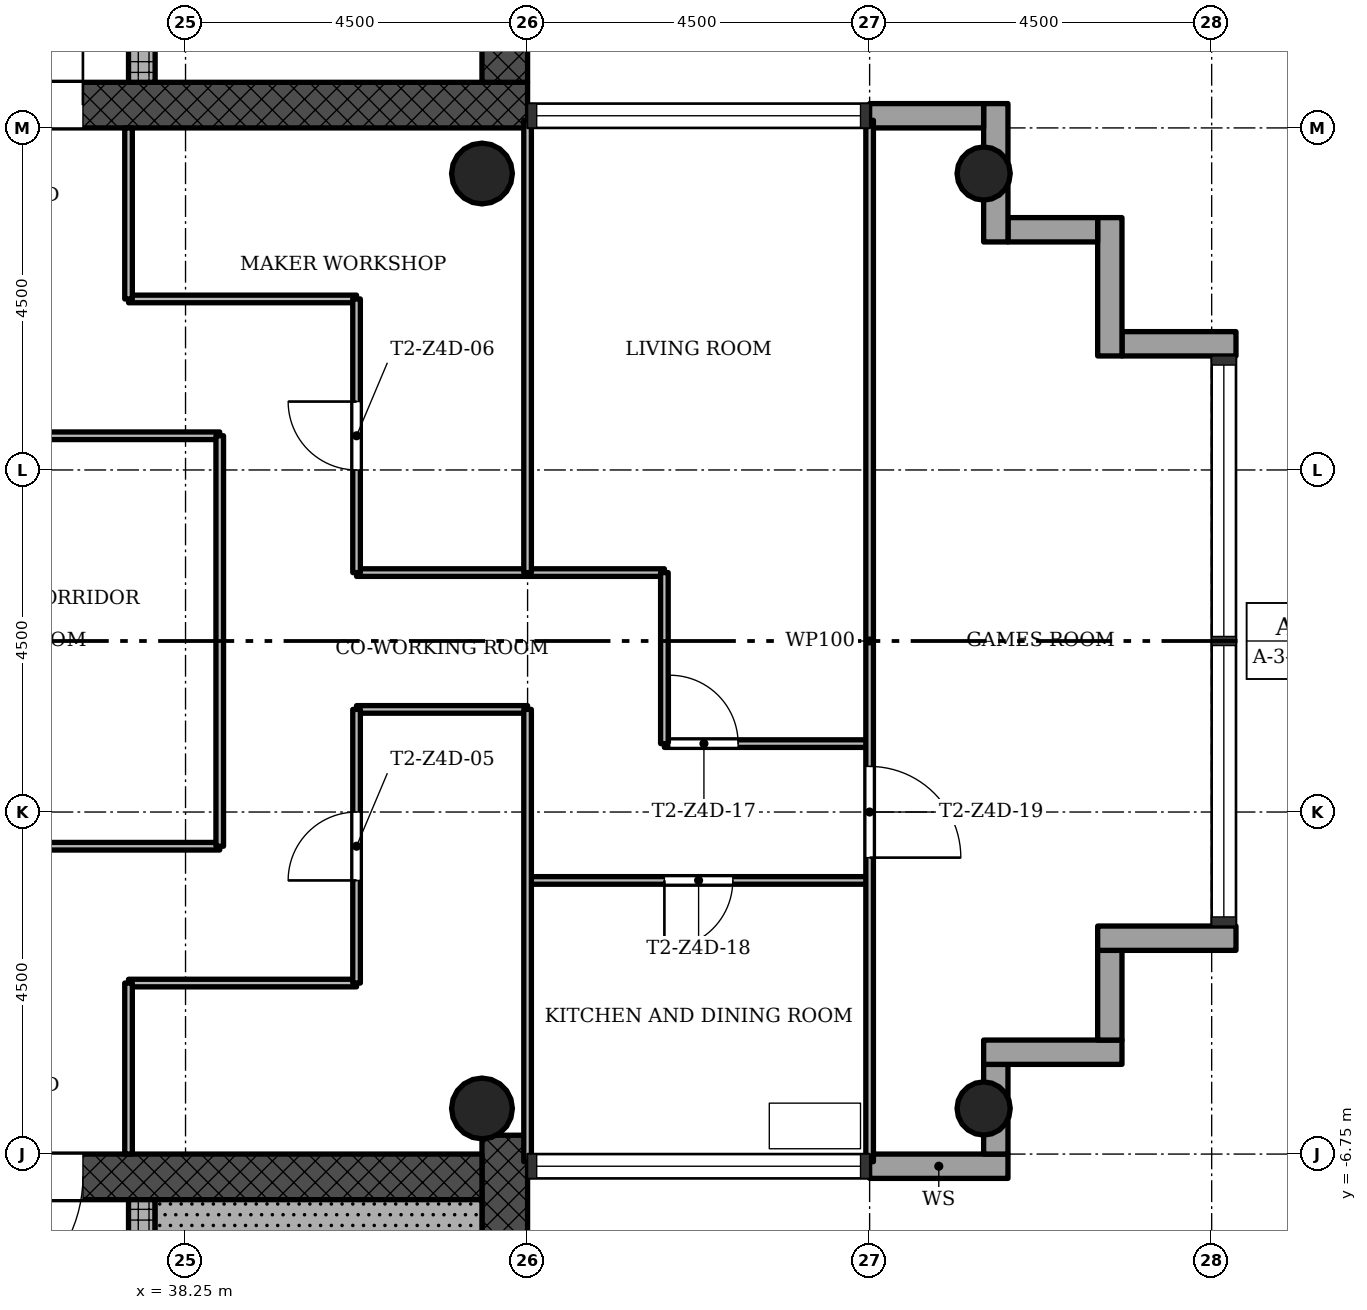
"""IFC4 building model, lengths in metres.
Left out: names, types, materials, properties, quantities, classifications, styles, units other than length and angle.
Written with IfcOpenShell. Run it as: python <this file> out.ifc"""

import sys

from ifc_helpers import new_model, si_unit, direction, frame, frame_2d, origin, origin_2d, place, context, subcontext, project, spatial, rectangle, hollow_circle, extrude, element, fill, save


model = new_model("IFC4")
c1 = context("Model", 3, precision=1e-05, world=origin(), true_north=direction((0.0, 1.0)))
c2 = subcontext(c1, "Body", "Model", "MODEL_VIEW")
j1 = project(units=[si_unit("LENGTHUNIT", "METRE"), si_unit("PLANEANGLEUNIT", "RADIAN")], contexts=[c1])
p1 = place(None, origin())
s1 = spatial("IfcSite", under=j1, at=p1, CompositionType="ELEMENT")
p2 = place(p1, origin())
s2 = spatial("IfcBuilding", under=s1, at=p2, CompositionType="ELEMENT")
p3 = place(p2, frame((0.0, 0.0, 199.4)))
s3 = spatial("IfcBuildingStorey", under=s2, at=p3, CompositionType="ELEMENT", Elevation=199.4)
p4 = place(p3, frame((29.85, 7.05, 0.0), z_axis=(0.0, 0.0, 1.0), x_axis=(1.0, 0.0, 0.0)))
e1 = element("IfcWall", 1, at=p4, inside=s3, PredefinedType="SHEAR", context=c2, shape_type="SweptSolid", body=[
    extrude(rectangle(XDim=12.9, YDim=0.6, at=frame_2d((6.45, 0.0))), origin(), (0.0, 0.0, 1.0), 3.4),
])
p5 = place(p4, frame((5.25, 0.0, 0.0)))
e2 = element("IfcOpeningElement", 2, at=p5, cuts=e1, PredefinedType="OPENING", context=c2, shape_type="SweptSolid", body=[
    extrude(rectangle(XDim=1.8, YDim=2.1, at=frame_2d((0.9, 1.05))), frame((0.0, 0.31, 0.0), z_axis=(0.0, -1.0, 0.0), x_axis=(1.0, 0.0, 0.0)), (0.0, 0.0, 1.0), 0.62),
])
p6 = place(p3, frame((42.45, 7.35, 0.0), z_axis=(0.0, 0.0, 1.0), x_axis=(0.0, 1.0, 0.0)))
e3 = element("IfcWall", 3, at=p6, inside=s3, PredefinedType="SHEAR", context=c2, shape_type="SweptSolid", body=[
    extrude(rectangle(XDim=8.4, YDim=0.6, at=frame_2d((4.2, 0.0))), origin(), (0.0, 0.0, 1.0), 3.4),
])
p7 = place(p3, frame((37.675, 7.35, 0.0), z_axis=(0.0, 0.0, 1.0), x_axis=(0.0, 1.0, 0.0)))
e4 = element("IfcWall", 4, at=p7, inside=s3, PredefinedType="SHEAR", context=c2, shape_type="SweptSolid", body=[
    extrude(rectangle(XDim=7.8, YDim=0.35, at=frame_2d((3.9, 0.0))), origin(), (0.0, 0.0, 1.0), 3.4),
])
p8 = place(p7, frame((1.15, 0.0, 0.0)))
e5 = element("IfcOpeningElement", 5, at=p8, cuts=e4, PredefinedType="OPENING", context=c2, shape_type="SweptSolid", body=[
    extrude(rectangle(XDim=1.1, YDim=2.1, at=frame_2d((0.55, 1.05))), frame((0.0, 0.185, 0.0), z_axis=(0.0, -1.0, 0.0), x_axis=(1.0, 0.0, 0.0)), (0.0, 0.0, 1.0), 0.37),
])
p9 = place(p7, frame((3.35, 0.0, 0.0)))
e6 = element("IfcOpeningElement", 6, at=p9, cuts=e4, PredefinedType="OPENING", context=c2, shape_type="SweptSolid", body=[
    extrude(rectangle(XDim=1.1, YDim=2.1, at=frame_2d((0.55, 1.05))), frame((0.0, 0.185, 0.0), z_axis=(0.0, -1.0, 0.0), x_axis=(1.0, 0.0, 0.0)), (0.0, 0.0, 1.0), 0.37),
])
p10 = place(p7, frame((5.55, 0.0, 0.0)))
e7 = element("IfcOpeningElement", 7, at=p10, cuts=e4, PredefinedType="OPENING", context=c2, shape_type="SweptSolid", body=[
    extrude(rectangle(XDim=1.1, YDim=2.1, at=frame_2d((0.55, 1.05))), frame((0.0, 0.185, 0.0), z_axis=(0.0, -1.0, 0.0), x_axis=(1.0, 0.0, 0.0)), (0.0, 0.0, 1.0), 0.37),
])
p11 = place(p3, frame((42.45, -15.15, 0.0), z_axis=(0.0, 0.0, 1.0), x_axis=(0.0, 1.0, 0.0)))
e8 = element("IfcWall", 8, at=p11, inside=s3, PredefinedType="SHEAR", context=c2, shape_type="SweptSolid", body=[
    extrude(rectangle(XDim=8.648, YDim=0.6, at=frame_2d((4.324, 0.0))), origin(), (0.0, 0.0, 1.0), 3.4),
])
p12 = place(p3, frame((42.15, -7.05, 0.0), z_axis=(0.0, 0.0, 1.0), x_axis=(-1.0, 0.0, 0.0)))
e9 = element("IfcWall", 9, at=p12, inside=s3, PredefinedType="SHEAR", context=c2, shape_type="SweptSolid", body=[
    extrude(rectangle(XDim=12.9, YDim=0.6, at=frame_2d((6.45, 0.0))), origin(), (0.0, 0.0, 1.0), 3.4),
])
p13 = place(p12, frame((5.25, 0.0, 0.0)))
e10 = element("IfcOpeningElement", 10, at=p13, cuts=e9, PredefinedType="OPENING", context=c2, shape_type="SweptSolid", body=[
    extrude(rectangle(XDim=1.8, YDim=2.1, at=frame_2d((0.9, 1.05))), frame((0.0, 0.31, 0.0), z_axis=(0.0, -1.0, 0.0), x_axis=(1.0, 0.0, 0.0)), (0.0, 0.0, 1.0), 0.62),
])
p14 = place(p3, frame((37.675, -15.15, 0.0), z_axis=(0.0, 0.0, 1.0), x_axis=(0.0, 1.0, 0.0)))
e11 = element("IfcWall", 11, at=p14, inside=s3, PredefinedType="SHEAR", context=c2, shape_type="SweptSolid", body=[
    extrude(rectangle(XDim=7.8, YDim=0.35, at=frame_2d((3.9, 0.0))), origin(), (0.0, 0.0, 1.0), 3.4),
])
p15 = place(p14, frame((5.85, 0.0, 0.0)))
e12 = element("IfcOpeningElement", 12, at=p15, cuts=e11, PredefinedType="OPENING", context=c2, shape_type="SweptSolid", body=[
    extrude(rectangle(XDim=0.9, YDim=2.1, at=frame_2d((0.45, 1.05))), frame((0.0, 0.185, 0.0), z_axis=(0.0, -1.0, 0.0), x_axis=(1.0, 0.0, 0.0)), (0.0, 0.0, 1.0), 0.37),
])
for number, where, z_axis, x_axis in (
    (13, (48.75, -6.15, 0.0), (0.0, 0.0, 1.0), (1.0, 0.0, 0.0)),
    (14, (48.75, 6.15, 0.0), (0.0, 0.0, 1.0), (1.0, 0.0, 0.0)),
):
    element("IfcColumn", number, at=place(p3, frame(where, z_axis=z_axis, x_axis=x_axis)), inside=s3, PredefinedType="COLUMN", context=c2, shape_type="SweptSolid", body=[
        extrude(hollow_circle(Radius=0.35, WallThickness=0.025, at=origin_2d()), origin(), (0.0, 0.0, 1.0), 3.4),
    ])
for number, where, z_axis, x_axis in (
    (15, (42.15, -6.15, 0.0), (0.0, 0.0, 1.0), (1.0, 0.0, 0.0)),
    (16, (42.15, 6.15, 0.0), (0.0, 0.0, 1.0), (1.0, 0.0, 0.0)),
):
    element("IfcColumn", number, at=place(p3, frame(where, z_axis=z_axis, x_axis=x_axis)), inside=s3, PredefinedType="COLUMN", context=c2, shape_type="SweptSolid", body=[
        extrude(hollow_circle(Radius=0.4, WallThickness=0.028, at=origin_2d()), origin(), (0.0, 0.0, 1.0), 3.4),
    ])
p16 = place(p3, frame((47.25, -6.91, -0.3), z_axis=(0.0, 0.0, 1.0), x_axis=(1.0, 0.0, 0.0)))
e17 = element("IfcWall", 17, at=p16, inside=s3, PredefinedType="STANDARD", context=c2, shape_type="SweptSolid", body=[
    extrude(rectangle(XDim=1.82, YDim=0.32, at=frame_2d((0.91, 0.0))), origin(), (0.0, 0.0, 1.0), 3.4),
])
p17 = place(p3, frame((48.91, -6.75, -0.3), z_axis=(0.0, 0.0, 1.0), x_axis=(0.0, 1.0, 0.0)))
e18 = element("IfcWall", 18, at=p17, inside=s3, PredefinedType="STANDARD", context=c2, shape_type="SweptSolid", body=[
    extrude(rectangle(XDim=1.18, YDim=0.32, at=frame_2d((0.59, 0.0))), origin(), (0.0, 0.0, 1.0), 3.4),
])
p18 = place(p3, frame((48.75, -5.41, -0.3), z_axis=(0.0, 0.0, 1.0), x_axis=(1.0, 0.0, 0.0)))
e19 = element("IfcWall", 19, at=p18, inside=s3, PredefinedType="STANDARD", context=c2, shape_type="SweptSolid", body=[
    extrude(rectangle(XDim=1.82, YDim=0.32, at=frame_2d((0.91, 0.0))), origin(), (0.0, 0.0, 1.0), 3.4),
])
p19 = place(p3, frame((50.41, -5.25, -0.3), z_axis=(0.0, 0.0, 1.0), x_axis=(0.0, 1.0, 0.0)))
e20 = element("IfcWall", 20, at=p19, inside=s3, PredefinedType="STANDARD", context=c2, shape_type="SweptSolid", body=[
    extrude(rectangle(XDim=1.18, YDim=0.32, at=frame_2d((0.59, 0.0))), origin(), (0.0, 0.0, 1.0), 3.4),
])
p20 = place(p3, frame((50.25, -3.91, -0.3), z_axis=(0.0, 0.0, 1.0), x_axis=(1.0, 0.0, 0.0)))
e21 = element("IfcWall", 21, at=p20, inside=s3, PredefinedType="STANDARD", context=c2, shape_type="SweptSolid", body=[
    extrude(rectangle(XDim=1.82, YDim=0.32, at=frame_2d((0.91, 0.0))), origin(), (0.0, 0.0, 1.0), 3.4),
])
p21 = place(p3, frame((52.07, 3.91, -0.3), z_axis=(0.0, 0.0, 1.0), x_axis=(-1.0, 0.0, 0.0)))
e22 = element("IfcWall", 22, at=p21, inside=s3, PredefinedType="STANDARD", context=c2, shape_type="SweptSolid", body=[
    extrude(rectangle(XDim=1.5, YDim=0.32, at=frame_2d((0.75, 0.0))), origin(), (0.0, 0.0, 1.0), 3.4),
])
p22 = place(p3, frame((50.41, 3.75, -0.3), z_axis=(0.0, 0.0, 1.0), x_axis=(0.0, 1.0, 0.0)))
e23 = element("IfcWall", 23, at=p22, inside=s3, PredefinedType="STANDARD", context=c2, shape_type="SweptSolid", body=[
    extrude(rectangle(XDim=1.82, YDim=0.32, at=frame_2d((0.91, 0.0))), origin(), (0.0, 0.0, 1.0), 3.4),
])
p23 = place(p3, frame((50.25, 5.41, -0.3), z_axis=(0.0, 0.0, 1.0), x_axis=(-1.0, 0.0, 0.0)))
e24 = element("IfcWall", 24, at=p23, inside=s3, PredefinedType="STANDARD", context=c2, shape_type="SweptSolid", body=[
    extrude(rectangle(XDim=1.18, YDim=0.32, at=frame_2d((0.59, 0.0))), origin(), (0.0, 0.0, 1.0), 3.4),
])
p24 = place(p3, frame((48.91, 5.25, -0.3), z_axis=(0.0, 0.0, 1.0), x_axis=(0.0, 1.0, 0.0)))
e25 = element("IfcWall", 25, at=p24, inside=s3, PredefinedType="STANDARD", context=c2, shape_type="SweptSolid", body=[
    extrude(rectangle(XDim=1.82, YDim=0.32, at=frame_2d((0.91, 0.0))), origin(), (0.0, 0.0, 1.0), 3.4),
])
p25 = place(p3, frame((48.75, 6.91, -0.3), z_axis=(0.0, 0.0, 1.0), x_axis=(-1.0, 0.0, 0.0)))
e26 = element("IfcWall", 26, at=p25, inside=s3, PredefinedType="STANDARD", context=c2, shape_type="SweptSolid", body=[
    extrude(rectangle(XDim=1.5, YDim=0.32, at=frame_2d((0.75, 0.0))), origin(), (0.0, 0.0, 1.0), 3.4),
])
p26 = place(p3, frame((40.5, -4.5, 0.0), z_axis=(0.0, 0.0, 1.0), x_axis=(-1.0, 0.0, 0.0)))
e27 = element("IfcWall", 27, at=p26, inside=s3, PredefinedType="PARTITIONING", context=c2, shape_type="SweptSolid", body=[
    extrude(rectangle(XDim=3.0, YDim=0.1, at=frame_2d((1.5, 0.0))), origin(), (0.0, 0.0, 1.0), 3.0),
])
p27 = place(p3, frame((47.25, -3.15, 0.0), z_axis=(0.0, 0.0, 1.0), x_axis=(-1.0, 0.0, 0.0)))
e28 = element("IfcWall", 28, at=p27, inside=s3, PredefinedType="PARTITIONING", context=c2, shape_type="SweptSolid", body=[
    extrude(rectangle(XDim=4.5, YDim=0.1, at=frame_2d((2.25, 0.0))), origin(), (0.0, 0.0, 1.0), 3.0),
])
p28 = place(p27, frame((1.8, 0.0, 0.0)))
e29 = element("IfcOpeningElement", 29, at=p28, cuts=e28, PredefinedType="OPENING", context=c2, shape_type="SweptSolid", body=[
    extrude(rectangle(XDim=0.9, YDim=2.1, at=frame_2d((0.45, 1.05))), frame((0.0, 0.06, 0.0), z_axis=(0.0, -1.0, 0.0), x_axis=(1.0, 0.0, 0.0)), (0.0, 0.0, 1.0), 0.12),
])
p29 = place(p3, frame((38.7, -2.7, 0.0), z_axis=(0.0, 0.0, 1.0), x_axis=(-1.0, 0.0, 0.0)))
e30 = element("IfcWall", 30, at=p29, inside=s3, PredefinedType="PARTITIONING", context=c2, shape_type="SweptSolid", body=[
    extrude(rectangle(XDim=5.4, YDim=0.1, at=frame_2d((2.7, 0.0))), origin(), (0.0, 0.0, 1.0), 3.0),
])
p30 = place(p3, frame((47.25, -1.35, 0.0), z_axis=(0.0, 0.0, 1.0), x_axis=(-1.0, 0.0, 0.0)))
e31 = element("IfcWall", 31, at=p30, inside=s3, PredefinedType="PARTITIONING", context=c2, shape_type="SweptSolid", body=[
    extrude(rectangle(XDim=2.7, YDim=0.1, at=frame_2d((1.35, 0.0))), origin(), (0.0, 0.0, 1.0), 3.0),
])
p31 = place(p30, frame((1.73, 0.0, 0.0)))
e32 = element("IfcOpeningElement", 32, at=p31, cuts=e31, PredefinedType="OPENING", context=c2, shape_type="SweptSolid", body=[
    extrude(rectangle(XDim=0.9, YDim=2.1, at=frame_2d((0.45, 1.05))), frame((0.0, 0.06, 0.0), z_axis=(0.0, -1.0, 0.0), x_axis=(1.0, 0.0, 0.0)), (0.0, 0.0, 1.0), 0.12),
])
p32 = place(p3, frame((42.75, -0.9, 0.0), z_axis=(0.0, 0.0, 1.0), x_axis=(-1.0, 0.0, 0.0)))
e33 = element("IfcWall", 33, at=p32, inside=s3, PredefinedType="PARTITIONING", context=c2, shape_type="SweptSolid", body=[
    extrude(rectangle(XDim=2.25, YDim=0.1, at=frame_2d((1.125, 0.0))), origin(), (0.0, 0.0, 1.0), 3.0),
])
p33 = place(p3, frame((44.55, 0.9, 0.0), z_axis=(0.0, 0.0, 1.0), x_axis=(-1.0, 0.0, 0.0)))
e34 = element("IfcWall", 34, at=p33, inside=s3, PredefinedType="PARTITIONING", context=c2, shape_type="SweptSolid", body=[
    extrude(rectangle(XDim=4.05, YDim=0.1, at=frame_2d((2.025, 0.0))), origin(), (0.0, 0.0, 1.0), 3.0),
])
p34 = place(p3, frame((38.7, 2.7, 0.0), z_axis=(0.0, 0.0, 1.0), x_axis=(-1.0, 0.0, 0.0)))
e35 = element("IfcWall", 35, at=p34, inside=s3, PredefinedType="PARTITIONING", context=c2, shape_type="SweptSolid", body=[
    extrude(rectangle(XDim=5.4, YDim=0.1, at=frame_2d((2.7, 0.0))), origin(), (0.0, 0.0, 1.0), 3.0),
])
p35 = place(p3, frame((40.5, 4.5, 0.0), z_axis=(0.0, 0.0, 1.0), x_axis=(-1.0, 0.0, 0.0)))
e36 = element("IfcWall", 36, at=p35, inside=s3, PredefinedType="PARTITIONING", context=c2, shape_type="SweptSolid", body=[
    extrude(rectangle(XDim=3.0, YDim=0.1, at=frame_2d((1.5, 0.0))), origin(), (0.0, 0.0, 1.0), 3.0),
])
p36 = place(p3, frame((47.25, -6.85, 0.0), z_axis=(0.0, 0.0, 1.0), x_axis=(0.0, 1.0, 0.0)))
e37 = element("IfcWall", 37, at=p36, inside=s3, PredefinedType="PARTITIONING", context=c2, shape_type="SweptSolid", body=[
    extrude(rectangle(XDim=13.7, YDim=0.1, at=frame_2d((6.85, 0.0))), origin(), (0.0, 0.0, 1.0), 3.0),
])
p37 = place(p36, frame((4.0, 0.0, 0.0)))
e38 = element("IfcOpeningElement", 38, at=p37, cuts=e37, PredefinedType="OPENING", context=c2, shape_type="SweptSolid", body=[
    extrude(rectangle(XDim=1.2, YDim=2.1, at=frame_2d((0.6, 1.05))), frame((0.0, 0.06, 0.0), z_axis=(0.0, -1.0, 0.0), x_axis=(1.0, 0.0, 0.0)), (0.0, 0.0, 1.0), 0.12),
])
p38 = place(p3, frame((44.55, -1.35, 0.0), z_axis=(0.0, 0.0, 1.0), x_axis=(0.0, 1.0, 0.0)))
e39 = element("IfcWall", 39, at=p38, inside=s3, PredefinedType="PARTITIONING", context=c2, shape_type="SweptSolid", body=[
    extrude(rectangle(XDim=2.25, YDim=0.1, at=frame_2d((1.125, 0.0))), origin(), (0.0, 0.0, 1.0), 3.0),
])
for number, where, z_axis, x_axis in (
    (40, (42.75, -6.85, 0.0), (0.0, 0.0, 1.0), (0.0, 1.0, 0.0)),
    (41, (42.75, 0.9, 0.0), (0.0, 0.0, 1.0), (0.0, 1.0, 0.0)),
):
    element("IfcWall", number, at=place(p3, frame(where, z_axis=z_axis, x_axis=x_axis)), inside=s3, PredefinedType="PARTITIONING", context=c2, shape_type="SweptSolid", body=[
        extrude(rectangle(XDim=5.95, YDim=0.1, at=frame_2d((2.975, 0.0))), origin(), (0.0, 0.0, 1.0), 3.0),
    ])
p39 = place(p3, frame((40.5, -4.5, 0.0), z_axis=(0.0, 0.0, 1.0), x_axis=(0.0, 1.0, 0.0)))
e42 = element("IfcWall", 42, at=p39, inside=s3, PredefinedType="PARTITIONING", context=c2, shape_type="SweptSolid", body=[
    extrude(rectangle(XDim=3.6, YDim=0.1, at=frame_2d((1.8, 0.0))), origin(), (0.0, 0.0, 1.0), 3.0),
])
p40 = place(p39, frame((1.35, 0.0, 0.0)))
e43 = element("IfcOpeningElement", 43, at=p40, cuts=e42, PredefinedType="OPENING", context=c2, shape_type="SweptSolid", body=[
    extrude(rectangle(XDim=0.9, YDim=2.1, at=frame_2d((0.45, 1.05))), frame((0.0, 0.06, 0.0), z_axis=(0.0, -1.0, 0.0), x_axis=(1.0, 0.0, 0.0)), (0.0, 0.0, 1.0), 0.12),
])
p41 = place(p3, frame((40.5, 0.9, 0.0), z_axis=(0.0, 0.0, 1.0), x_axis=(0.0, 1.0, 0.0)))
e44 = element("IfcWall", 44, at=p41, inside=s3, PredefinedType="PARTITIONING", context=c2, shape_type="SweptSolid", body=[
    extrude(rectangle(XDim=3.6, YDim=0.1, at=frame_2d((1.8, 0.0))), origin(), (0.0, 0.0, 1.0), 3.0),
])
p42 = place(p41, frame((1.35, 0.0, 0.0)))
e45 = element("IfcOpeningElement", 45, at=p42, cuts=e44, PredefinedType="OPENING", context=c2, shape_type="SweptSolid", body=[
    extrude(rectangle(XDim=0.9, YDim=2.1, at=frame_2d((0.45, 1.05))), frame((0.0, 0.06, 0.0), z_axis=(0.0, -1.0, 0.0), x_axis=(1.0, 0.0, 0.0)), (0.0, 0.0, 1.0), 0.12),
])
p43 = place(p3, frame((38.7, -2.7, 0.0), z_axis=(0.0, 0.0, 1.0), x_axis=(0.0, 1.0, 0.0)))
e46 = element("IfcWall", 46, at=p43, inside=s3, PredefinedType="PARTITIONING", context=c2, shape_type="SweptSolid", body=[
    extrude(rectangle(XDim=5.4, YDim=0.1, at=frame_2d((2.7, 0.0))), origin(), (0.0, 0.0, 1.0), 3.0),
])
for number, where, z_axis, x_axis in (
    (47, (37.5, -6.75, 0.0), (0.0, 0.0, 1.0), (0.0, 1.0, 0.0)),
    (48, (37.5, 4.5, 0.0), (0.0, 0.0, 1.0), (0.0, 1.0, 0.0)),
):
    element("IfcWall", number, at=place(p3, frame(where, z_axis=z_axis, x_axis=x_axis)), inside=s3, PredefinedType="PARTITIONING", context=c2, shape_type="SweptSolid", body=[
        extrude(rectangle(XDim=2.25, YDim=0.1, at=frame_2d((1.125, 0.0))), origin(), (0.0, 0.0, 1.0), 3.0),
    ])
p44 = place(p3, frame((37.85, -7.65, 0.0), z_axis=(0.0, 0.0, 1.0), x_axis=(1.0, 0.0, 0.0)))
e49 = element("IfcWall", 49, at=p44, inside=s3, PredefinedType="SHEAR", context=c2, shape_type="SweptSolid", body=[
    extrude(rectangle(XDim=4.3, YDim=0.6, at=frame_2d((2.15, 0.0))), origin(), (0.0, 0.0, 1.0), 3.4),
])
p45 = place(p40, origin())
e50 = element("IfcDoor", 50, at=p45, inside=s3, OperationType="SINGLE_SWING_RIGHT", PredefinedType="DOOR", context=c2, shape_type="SweptSolid", body=[
    extrude(rectangle(XDim=0.9, YDim=2.1, at=frame_2d((0.45, 1.05))), frame((0.0, 0.025, 0.0), z_axis=(0.0, -1.0, 0.0), x_axis=(1.0, 0.0, 0.0)), (0.0, 0.0, 1.0), 0.05),
])
fill(e43, e50)
p46 = place(p42, origin())
e51 = element("IfcDoor", 51, at=p46, inside=s3, OperationType="SINGLE_SWING_LEFT", PredefinedType="DOOR", context=c2, shape_type="SweptSolid", body=[
    extrude(rectangle(XDim=0.9, YDim=2.1, at=frame_2d((0.45, 1.05))), frame((0.0, 0.025, 0.0), z_axis=(0.0, -1.0, 0.0), x_axis=(1.0, 0.0, 0.0)), (0.0, 0.0, 1.0), 0.05),
])
fill(e45, e51)
p47 = place(p31, origin())
e52 = element("IfcDoor", 52, at=p47, inside=s3, OperationType="SINGLE_SWING_RIGHT", PredefinedType="DOOR", context=c2, shape_type="SweptSolid", body=[
    extrude(rectangle(XDim=0.9, YDim=2.1, at=frame_2d((0.45, 1.05))), frame((0.0, 0.025, 0.0), z_axis=(0.0, -1.0, 0.0), x_axis=(1.0, 0.0, 0.0)), (0.0, 0.0, 1.0), 0.05),
])
fill(e32, e52)
p48 = place(p28, origin())
e53 = element("IfcDoor", 53, at=p48, inside=s3, OperationType="SINGLE_SWING_LEFT", PredefinedType="DOOR", context=c2, shape_type="SweptSolid", body=[
    extrude(rectangle(XDim=0.9, YDim=2.1, at=frame_2d((0.45, 1.05))), frame((0.0, 0.025, 0.0), z_axis=(0.0, -1.0, 0.0), x_axis=(1.0, 0.0, 0.0)), (0.0, 0.0, 1.0), 0.05),
])
fill(e29, e53)
p49 = place(p37, origin())
e54 = element("IfcDoor", 54, at=p49, inside=s3, OperationType="SINGLE_SWING_LEFT", PredefinedType="DOOR", context=c2, shape_type="SweptSolid", body=[
    extrude(rectangle(XDim=1.2, YDim=2.1, at=frame_2d((0.6, 1.05))), frame((0.0, 0.025, 0.0), z_axis=(0.0, -1.0, 0.0), x_axis=(1.0, 0.0, 0.0)), (0.0, 0.0, 1.0), 0.05),
])
fill(e38, e54)
p50 = place(p5, origin())
e55 = element("IfcDoor", 55, at=p50, inside=s3, OperationType="SINGLE_SWING_LEFT", PredefinedType="DOOR", context=c2, shape_type="SweptSolid", body=[
    extrude(rectangle(XDim=1.8, YDim=2.1, at=frame_2d((0.9, 1.05))), frame((0.0, 0.025, 0.0), z_axis=(0.0, -1.0, 0.0), x_axis=(1.0, 0.0, 0.0)), (0.0, 0.0, 1.0), 0.05),
])
fill(e2, e55)
p51 = place(p13, origin())
e56 = element("IfcDoor", 56, at=p51, inside=s3, OperationType="SINGLE_SWING_LEFT", PredefinedType="DOOR", context=c2, shape_type="SweptSolid", body=[
    extrude(rectangle(XDim=1.8, YDim=2.1, at=frame_2d((0.9, 1.05))), frame((0.0, 0.025, 0.0), z_axis=(0.0, -1.0, 0.0), x_axis=(1.0, 0.0, 0.0)), (0.0, 0.0, 1.0), 0.05),
])
fill(e10, e56)
save(model, sys.argv[1])
